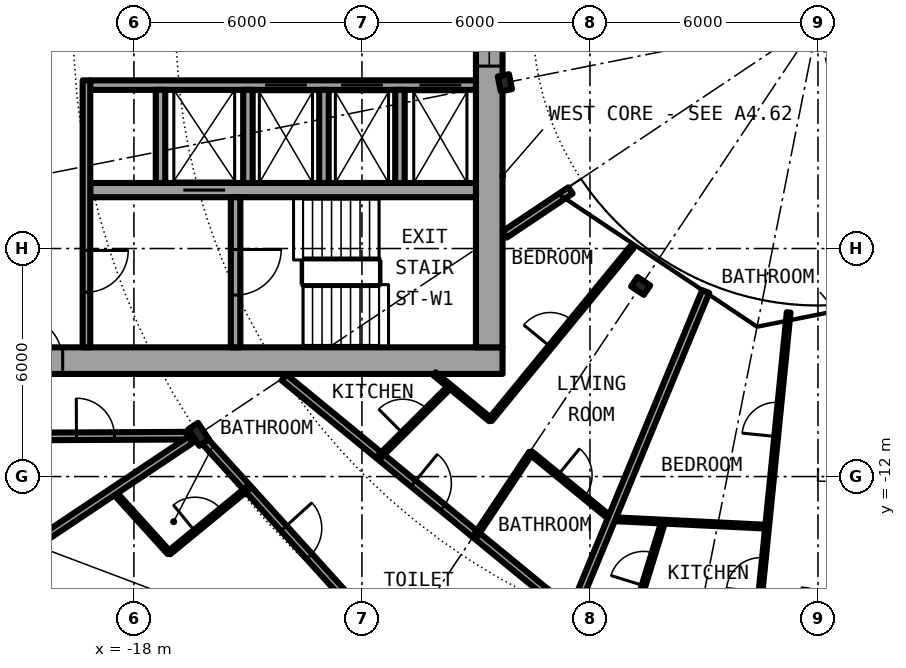
"""IFC4 building model, lengths in metres.
Left out: names, types, materials, properties, quantities, classifications, styles, units other than length and angle.
Written with IfcOpenShell. Run it as: python <this file> out.ifc"""

import sys

from ifc_helpers import new_model, si_unit, direction, frame, frame_2d, origin, origin_2d, place, context, subcontext, project, spatial, rectangle, i_section, extrude, element, fill, save


model = new_model("IFC4")
c1 = context("Model", 3, precision=1e-05, world=origin(), true_north=direction((0.0, 1.0)))
c2 = subcontext(c1, "Body", "Model", "MODEL_VIEW")
j1 = project(units=[si_unit("LENGTHUNIT", "METRE"), si_unit("PLANEANGLEUNIT", "RADIAN")], contexts=[c1])
p1 = place(None, origin())
s1 = spatial("IfcSite", under=j1, at=p1, CompositionType="ELEMENT")
p2 = place(p1, origin())
s2 = spatial("IfcBuilding", under=s1, at=p2, CompositionType="ELEMENT")
p3 = place(p2, frame((0.0, 0.0, 75.8)))
s3 = spatial("IfcBuildingStorey", under=s2, at=p3, CompositionType="ELEMENT", Elevation=75.8)
p4 = place(p3, frame((-16.297, -10.889, 0.0), z_axis=(0.0, 0.0, 1.0), x_axis=(-0.831469612303, -0.55557023302, 0.0)))
e1 = element("IfcColumn", 1, at=p4, inside=s3, PredefinedType="COLUMN", context=c2, shape_type="SweptSolid", body=[
    extrude(i_section(OverallWidth=0.306, OverallDepth=0.524, WebThickness=0.021, FlangeThickness=0.04, FilletRadius=0.027, at=origin_2d()), origin(), (0.0, 0.0, 1.0), 3.05),
])
for number, where, z_axis, x_axis in (
    (2, (-8.239, -1.639, 0.0), (0.0, 0.0, 1.0), (-0.981, -0.195, 0.0)),
    (3, (-4.667, -6.984, 0.0), (0.0, 0.0, 1.0), (-0.556, -0.831, 0.0)),
):
    element("IfcColumn", number, at=place(p3, frame(where, z_axis=z_axis, x_axis=x_axis)), inside=s3, PredefinedType="COLUMN", context=c2, shape_type="SweptSolid", body=[
        extrude(i_section(OverallWidth=0.3, OverallDepth=0.4, WebThickness=0.013, FlangeThickness=0.024, FilletRadius=0.027, at=origin_2d()), origin(), (0.0, 0.0, 1.0), 3.05),
    ])
p5 = place(p3, frame((-22.3, -8.95, 0.0), z_axis=(0.0, 0.0, 1.0), x_axis=(1.0, 0.0, 0.0)))
e4 = element("IfcWall", 4, at=p5, inside=s3, PredefinedType="SHEAR", context=c2, shape_type="SweptSolid", body=[
    extrude(rectangle(XDim=14.0, YDim=0.7, at=frame_2d((7.0, 0.0))), origin(), (0.0, 0.0, 1.0), 3.05),
])
p6 = place(p5, frame((1.225, 0.0, 0.0)))
e5 = element("IfcOpeningElement", 5, at=p6, cuts=e4, PredefinedType="OPENING", context=c2, shape_type="SweptSolid", body=[
    extrude(rectangle(XDim=1.2, YDim=2.3, at=frame_2d((0.6, 1.15))), frame((0.0, 0.36, 0.0), z_axis=(0.0, -1.0, 0.0), x_axis=(1.0, 0.0, 0.0)), (0.0, 0.0, 1.0), 0.72),
])
p7 = place(p3, frame((-8.65, 8.6, 0.0), z_axis=(0.0, 0.0, 1.0), x_axis=(0.0, -1.0, 0.0)))
e6 = element("IfcWall", 6, at=p7, inside=s3, PredefinedType="SHEAR", context=c2, shape_type="SweptSolid", body=[
    extrude(rectangle(XDim=17.2, YDim=0.7, at=frame_2d((8.6, 0.0))), origin(), (0.0, 0.0, 1.0), 3.05),
])
p8 = place(p7, frame((7.4, 0.0, 0.1)))
e7 = element("IfcOpeningElement", 7, at=p8, cuts=e6, PredefinedType="OPENING", context=c2, shape_type="SweptSolid", body=[
    extrude(rectangle(XDim=2.4, YDim=2.2, at=frame_2d((1.2, 1.1))), frame((0.0, 0.36, 0.0), z_axis=(0.0, -1.0, 0.0), x_axis=(1.0, 0.0, 0.0)), (0.0, 0.0, 1.0), 0.72),
])
p9 = place(p3, frame((-9.0, -1.7, 0.0), z_axis=(0.0, 0.0, 1.0), x_axis=(-1.0, 0.0, 0.0)))
e8 = element("IfcWall", 8, at=p9, inside=s3, PredefinedType="SHEAR", context=c2, shape_type="SweptSolid", body=[
    extrude(rectangle(XDim=10.15, YDim=0.25, at=frame_2d((5.075, 0.0))), origin(), (0.0, 0.0, 1.0), 3.05),
])
p10 = place(p9, frame((0.387, 0.0, 0.0)))
e9 = element("IfcOpeningElement", 9, at=p10, cuts=e8, PredefinedType="OPENING", context=c2, shape_type="SweptSolid", body=[
    extrude(rectangle(XDim=1.1, YDim=2.3, at=frame_2d((0.55, 1.15))), frame((0.0, 0.135, 0.0), z_axis=(0.0, -1.0, 0.0), x_axis=(1.0, 0.0, 0.0)), (0.0, 0.0, 1.0), 0.27),
])
p11 = place(p9, frame((2.45, 0.0, 0.0)))
e10 = element("IfcOpeningElement", 10, at=p11, cuts=e8, PredefinedType="OPENING", context=c2, shape_type="SweptSolid", body=[
    extrude(rectangle(XDim=1.1, YDim=2.3, at=frame_2d((0.55, 1.15))), frame((0.0, 0.135, 0.0), z_axis=(0.0, -1.0, 0.0), x_axis=(1.0, 0.0, 0.0)), (0.0, 0.0, 1.0), 0.27),
])
p12 = place(p9, frame((4.45, 0.0, 0.0)))
e11 = element("IfcOpeningElement", 11, at=p12, cuts=e8, PredefinedType="OPENING", context=c2, shape_type="SweptSolid", body=[
    extrude(rectangle(XDim=1.1, YDim=2.3, at=frame_2d((0.55, 1.15))), frame((0.0, 0.135, 0.0), z_axis=(0.0, -1.0, 0.0), x_axis=(1.0, 0.0, 0.0)), (0.0, 0.0, 1.0), 0.27),
])
p13 = place(p3, frame((-9.0, -4.462, 0.0), z_axis=(0.0, 0.0, 1.0), x_axis=(-1.0, 0.0, 0.0)))
e12 = element("IfcWall", 12, at=p13, inside=s3, PredefinedType="SHEAR", context=c2, shape_type="SweptSolid", body=[
    extrude(rectangle(XDim=10.15, YDim=0.375, at=frame_2d((5.075, 0.0))), origin(), (0.0, 0.0, 1.0), 3.05),
])
p14 = place(p13, frame((6.6, 0.0, 0.0)))
e13 = element("IfcOpeningElement", 13, at=p14, cuts=e12, PredefinedType="OPENING", context=c2, shape_type="SweptSolid", body=[
    extrude(rectangle(XDim=1.1, YDim=2.3, at=frame_2d((0.55, 1.15))), frame((0.0, 0.198, 0.0), z_axis=(0.0, -1.0, 0.0), x_axis=(1.0, 0.0, 0.0)), (0.0, 0.0, 1.0), 0.395),
])
p15 = place(p3, frame((-15.325, -4.65, 0.0), z_axis=(0.0, 0.0, 1.0), x_axis=(0.0, -1.0, 0.0)))
e14 = element("IfcWall", 14, at=p15, inside=s3, PredefinedType="SHEAR", context=c2, shape_type="SweptSolid", body=[
    extrude(rectangle(XDim=3.95, YDim=0.25, at=frame_2d((1.975, 0.0))), origin(), (0.0, 0.0, 1.0), 3.05),
])
p16 = place(p15, frame((1.375, 0.0, 0.0)))
e15 = element("IfcOpeningElement", 15, at=p16, cuts=e14, PredefinedType="OPENING", context=c2, shape_type="SweptSolid", body=[
    extrude(rectangle(XDim=1.2, YDim=2.3, at=frame_2d((0.6, 1.15))), frame((0.0, 0.135, 0.0), z_axis=(0.0, -1.0, 0.0), x_axis=(1.0, 0.0, 0.0)), (0.0, 0.0, 1.0), 0.27),
])
for number, where, z_axis, x_axis in (
    (16, (-15.0, -1.825, 0.0), (0.0, 0.0, 1.0), (0.0, -1.0, 0.0)),
    (17, (-17.3, -1.825, 0.0), (0.0, 0.0, 1.0), (0.0, -1.0, 0.0)),
):
    element("IfcWall", number, at=place(p3, frame(where, z_axis=z_axis, x_axis=x_axis)), inside=s3, PredefinedType="SOLIDWALL", context=c2, shape_type="SweptSolid", body=[
        extrude(rectangle(XDim=2.45, YDim=0.25, at=frame_2d((1.225, 0.0))), origin(), (0.0, 0.0, 1.0), 2.7),
    ])
p17 = place(p3, frame((-19.25, -1.575, 0.0), z_axis=(0.0, 0.0, 1.0), x_axis=(0.0, -1.0, 0.0)))
e18 = element("IfcWall", 18, at=p17, inside=s3, PredefinedType="SOLIDWALL", context=c2, shape_type="SweptSolid", body=[
    extrude(rectangle(XDim=7.025, YDim=0.2, at=frame_2d((3.513, 0.0))), origin(), (0.0, 0.0, 1.0), 2.7),
])
p18 = place(p17, frame((4.475, 0.0, 0.0)))
e19 = element("IfcOpeningElement", 19, at=p18, cuts=e18, PredefinedType="OPENING", context=c2, shape_type="SweptSolid", body=[
    extrude(rectangle(XDim=1.1, YDim=2.3, at=frame_2d((0.55, 1.15))), frame((0.0, 0.11, 0.0), z_axis=(0.0, -1.0, 0.0), x_axis=(1.0, 0.0, 0.0)), (0.0, 0.0, 1.0), 0.22),
])
for number, where, z_axis, x_axis in (
    (20, (-11.0, -1.825, 0.0), (0.0, 0.0, 1.0), (0.0, -1.0, 0.0)),
    (21, (-13.0, -1.825, 0.0), (0.0, 0.0, 1.0), (0.0, -1.0, 0.0)),
):
    element("IfcWall", number, at=place(p3, frame(where, z_axis=z_axis, x_axis=x_axis)), inside=s3, PredefinedType="SOLIDWALL", context=c2, shape_type="SweptSolid", body=[
        extrude(rectangle(XDim=2.45, YDim=0.25, at=frame_2d((1.225, 0.0))), origin(), (0.0, 0.0, 1.0), 2.7),
    ])
p19 = place(p3, frame((-18.542, -12.389, 0.0), z_axis=(0.0, 0.0, 1.0), x_axis=(0.671396556615, -0.741098282123, 0.0)))
e22 = element("IfcWall", 22, at=p19, inside=s3, PredefinedType="PARTITIONING", context=c2, shape_type="SweptSolid", body=[
    extrude(rectangle(XDim=2.182, YDim=0.1, at=frame_2d((1.091, 0.0))), origin(), (0.0, 0.0, 1.0), 2.7),
])
p20 = place(p3, frame((-16.193, -11.004, 0.0), z_axis=(0.0, 0.0, 1.0), x_axis=(0.671601747072, -0.740912338492, 0.0)))
e23 = element("IfcWall", 23, at=p20, inside=s3, PredefinedType="PARTITIONING", context=c2, shape_type="SweptSolid", body=[
    extrude(rectangle(XDim=5.597, YDim=0.2, at=frame_2d((2.799, 0.0))), origin(), (0.0, 0.0, 1.0), 2.38),
])
p21 = place(p20, frame((3.18, 0.0, 0.0)))
e24 = element("IfcOpeningElement", 24, at=p21, cuts=e23, PredefinedType="OPENING", context=c2, shape_type="SweptSolid", body=[
    extrude(rectangle(XDim=1.0, YDim=2.3, at=frame_2d((0.5, 1.15))), frame((0.0, 0.11, 0.0), z_axis=(0.0, -1.0, 0.0), x_axis=(1.0, 0.0, 0.0)), (0.0, 0.0, 1.0), 0.22),
])
p22 = place(p3, frame((-14.05, -9.392, 0.0), z_axis=(0.0, 0.0, 1.0), x_axis=(0.773074935257, -0.634314704605, 0.0)))
e25 = element("IfcWall", 25, at=p22, inside=s3, PredefinedType="PARTITIONING", context=c2, shape_type="SweptSolid", body=[
    extrude(rectangle(XDim=9.809, YDim=0.2, at=frame_2d((4.904, 0.0))), origin(), (0.0, 0.0, 1.0), 2.7),
])
p23 = place(p22, frame((4.402, 0.0, 0.0)))
e26 = element("IfcOpeningElement", 26, at=p23, cuts=e25, PredefinedType="OPENING", context=c2, shape_type="SweptSolid", body=[
    extrude(rectangle(XDim=1.0, YDim=2.3, at=frame_2d((0.5, 1.15))), frame((0.0, 0.11, 0.0), z_axis=(0.0, -1.0, 0.0), x_axis=(1.0, 0.0, 0.0)), (0.0, 0.0, 1.0), 0.22),
])
p24 = place(p3, frame((-10.093, -9.296, 0.0), z_axis=(0.0, 0.0, 1.0), x_axis=(0.772957368531, -0.6344579627, 0.0)))
e27 = element("IfcWall", 27, at=p24, inside=s3, PredefinedType="PARTITIONING", context=c2, shape_type="SweptSolid", body=[
    extrude(rectangle(XDim=1.906, YDim=0.1, at=frame_2d((0.953, 0.0))), origin(), (0.0, 0.0, 1.0), 2.7),
])
p25 = place(p3, frame((-7.558, -11.376, 0.0), z_axis=(0.0, 0.0, 1.0), x_axis=(0.773049907698, -0.634345205868, 0.0)))
e28 = element("IfcWall", 28, at=p25, inside=s3, PredefinedType="PARTITIONING", context=c2, shape_type="SweptSolid", body=[
    extrude(rectangle(XDim=2.748, YDim=0.1, at=frame_2d((1.374, 0.0))), origin(), (0.0, 0.0, 1.0), 2.7),
])
p26 = place(p25, frame((0.924, 0.0, 0.0)))
e29 = element("IfcOpeningElement", 29, at=p26, cuts=e28, PredefinedType="OPENING", context=c2, shape_type="SweptSolid", body=[
    extrude(rectangle(XDim=0.9, YDim=2.3, at=frame_2d((0.45, 1.15))), frame((0.0, 0.06, 0.0), z_axis=(0.0, -1.0, 0.0), x_axis=(1.0, 0.0, 0.0)), (0.0, 0.0, 1.0), 0.12),
])
p27 = place(p3, frame((-5.434, -13.119, 0.0), z_axis=(0.0, 0.0, 1.0), x_axis=(0.998795469779, -0.049067398026, 0.0)))
e30 = element("IfcWall", 30, at=p27, inside=s3, PredefinedType="PARTITIONING", context=c2, shape_type="SweptSolid", body=[
    extrude(rectangle(XDim=4.1, YDim=0.1, at=frame_2d((2.05, 0.0))), origin(), (0.0, 0.0, 1.0), 2.7),
])
p28 = place(p3, frame((-21.675, -10.95, 0.0), z_axis=(0.0, 0.0, 1.0), x_axis=(0.999987054722, 0.005088259783, 0.0)))
e31 = element("IfcWall", 31, at=p28, inside=s3, PredefinedType="PARTITIONING", context=c2, shape_type="SweptSolid", body=[
    extrude(rectangle(XDim=5.086, YDim=0.2, at=frame_2d((2.543, 0.0))), origin(), (0.0, 0.0, 1.0), 2.7),
])
p29 = place(p28, frame((2.163, 0.0, 0.0)))
e32 = element("IfcOpeningElement", 32, at=p29, cuts=e31, PredefinedType="OPENING", context=c2, shape_type="SweptSolid", body=[
    extrude(rectangle(XDim=1.0, YDim=2.3, at=frame_2d((0.5, 1.15))), frame((0.0, 0.11, 0.0), z_axis=(0.0, -1.0, 0.0), x_axis=(1.0, 0.0, 0.0)), (0.0, 0.0, 1.0), 0.22),
])
p30 = place(p3, frame((-6.513, -4.472, 0.0), z_axis=(0.0, 0.0, 1.0), x_axis=(-0.831382204863, -0.555701025225, 0.0)))
e33 = element("IfcWall", 33, at=p30, inside=s3, PredefinedType="PARTITIONING", context=c2, shape_type="SweptSolid", body=[
    extrude(rectangle(XDim=2.082, YDim=0.2, at=frame_2d((1.041, 0.0))), origin(), (0.0, 0.0, 1.0), 2.7),
])
p31 = place(p3, frame((-22.595, -15.097, 0.0), z_axis=(0.0, 0.0, 1.0), x_axis=(0.831505405283, 0.555516661303, 0.0)))
e34 = element("IfcWall", 34, at=p31, inside=s3, PredefinedType="PARTITIONING", context=c2, shape_type="SweptSolid", body=[
    extrude(rectangle(XDim=7.312, YDim=0.2, at=frame_2d((3.656, 0.0))), origin(), (0.0, 0.0, 1.0), 2.7),
])
p32 = place(p3, frame((-17.077, -14.006, 0.0), z_axis=(0.0, 0.0, 1.0), x_axis=(0.77319617123, 0.634166918717, 0.0)))
e35 = element("IfcWall", 35, at=p32, inside=s3, PredefinedType="PARTITIONING", context=c2, shape_type="SweptSolid", body=[
    extrude(rectangle(XDim=2.675, YDim=0.1, at=frame_2d((1.337, 0.0))), origin(), (0.0, 0.0, 1.0), 2.7),
])
p33 = place(p32, frame((0.887, 0.0, 0.0)))
e36 = element("IfcOpeningElement", 36, at=p33, cuts=e35, PredefinedType="OPENING", context=c2, shape_type="SweptSolid", body=[
    extrude(rectangle(XDim=0.9, YDim=2.3, at=frame_2d((0.45, 1.15))), frame((0.0, 0.06, 0.0), z_axis=(0.0, -1.0, 0.0), x_axis=(1.0, 0.0, 0.0)), (0.0, 0.0, 1.0), 0.12),
])
p34 = place(p3, frame((-11.524, -11.464, 0.0), z_axis=(0.0, 0.0, 1.0), x_axis=(0.708796844581, 0.705412668665, 0.0)))
e37 = element("IfcWall", 37, at=p34, inside=s3, PredefinedType="PARTITIONING", context=c2, shape_type="SweptSolid", body=[
    extrude(rectangle(XDim=2.597, YDim=0.1, at=frame_2d((1.299, 0.0))), origin(), (0.0, 0.0, 1.0), 2.7),
])
p35 = place(p34, frame((0.849, 0.0, 0.0)))
e38 = element("IfcOpeningElement", 38, at=p35, cuts=e37, PredefinedType="OPENING", context=c2, shape_type="SweptSolid", body=[
    extrude(rectangle(XDim=0.9, YDim=2.3, at=frame_2d((0.45, 1.15))), frame((0.0, 0.06, 0.0), z_axis=(0.0, -1.0, 0.0), x_axis=(1.0, 0.0, 0.0)), (0.0, 0.0, 1.0), 0.12),
])
p36 = place(p3, frame((-8.996, -13.539, 0.0), z_axis=(0.0, 0.0, 1.0), x_axis=(0.553615197403, 0.83277260594, 0.0)))
e39 = element("IfcWall", 39, at=p36, inside=s3, PredefinedType="PARTITIONING", context=c2, shape_type="SweptSolid", body=[
    extrude(rectangle(XDim=2.597, YDim=0.1, at=frame_2d((1.299, 0.0))), origin(), (0.0, 0.0, 1.0), 2.7),
])
p37 = place(p3, frame((-8.62, -10.504, 0.0), z_axis=(0.0, 0.0, 1.0), x_axis=(0.634358693064, 0.773038840249, 0.0)))
e40 = element("IfcWall", 40, at=p37, inside=s3, PredefinedType="PARTITIONING", context=c2, shape_type="SweptSolid", body=[
    extrude(rectangle(XDim=5.868, YDim=0.1, at=frame_2d((2.934, 0.0))), origin(), (0.0, 0.0, 1.0), 2.7),
])
p38 = place(p37, frame((2.484, 0.0, 0.0)))
e41 = element("IfcOpeningElement", 41, at=p38, cuts=e40, PredefinedType="OPENING", context=c2, shape_type="SweptSolid", body=[
    extrude(rectangle(XDim=0.9, YDim=2.3, at=frame_2d((0.45, 1.15))), frame((0.0, 0.06, 0.0), z_axis=(0.0, -1.0, 0.0), x_axis=(1.0, 0.0, 0.0)), (0.0, 0.0, 1.0), 0.12),
])
p39 = place(p3, frame((-6.467, -15.614, 0.0), z_axis=(0.0, 0.0, 1.0), x_axis=(0.382646942224, 0.923894646378, 0.0)))
e42 = element("IfcWall", 42, at=p39, inside=s3, PredefinedType="PARTITIONING", context=c2, shape_type="SweptSolid", body=[
    extrude(rectangle(XDim=9.181, YDim=0.2, at=frame_2d((4.59, 0.0))), origin(), (0.0, 0.0, 1.0), 2.7),
])
p40 = place(p3, frame((-4.843, -15.693, 0.0), z_axis=(0.0, 0.0, 1.0), x_axis=(0.294961884541, 0.955509019669, 0.0)))
e43 = element("IfcWall", 43, at=p40, inside=s3, PredefinedType="PARTITIONING", context=c2, shape_type="SweptSolid", body=[
    extrude(rectangle(XDim=2.624, YDim=0.1, at=frame_2d((1.312, 0.0))), origin(), (0.0, 0.0, 1.0), 2.7),
])
p41 = place(p40, frame((0.862, 0.0, 0.0)))
e44 = element("IfcOpeningElement", 44, at=p41, cuts=e43, PredefinedType="OPENING", context=c2, shape_type="SweptSolid", body=[
    extrude(rectangle(XDim=0.9, YDim=2.3, at=frame_2d((0.45, 1.15))), frame((0.0, 0.06, 0.0), z_axis=(0.0, -1.0, 0.0), x_axis=(1.0, 0.0, 0.0)), (0.0, 0.0, 1.0), 0.12),
])
p42 = place(p3, frame((-1.593, -15.853, 0.0), z_axis=(0.0, 0.0, 1.0), x_axis=(0.100083483356, 0.994979043176, 0.0)))
e45 = element("IfcWall", 45, at=p42, inside=s3, PredefinedType="PARTITIONING", context=c2, shape_type="SweptSolid", body=[
    extrude(rectangle(XDim=8.213, YDim=0.1, at=frame_2d((4.107, 0.0))), origin(), (0.0, 0.0, 1.0), 2.7),
])
p43 = place(p42, frame((0.823, 0.0, 0.0)))
e46 = element("IfcOpeningElement", 46, at=p43, cuts=e45, PredefinedType="OPENING", context=c2, shape_type="SweptSolid", body=[
    extrude(rectangle(XDim=0.9, YDim=2.3, at=frame_2d((0.45, 1.15))), frame((0.0, 0.06, 0.0), z_axis=(0.0, -1.0, 0.0), x_axis=(1.0, 0.0, 0.0)), (0.0, 0.0, 1.0), 0.12),
])
p44 = place(p42, frame((4.931, 0.0, 0.0)))
e47 = element("IfcOpeningElement", 47, at=p44, cuts=e45, PredefinedType="OPENING", context=c2, shape_type="SweptSolid", body=[
    extrude(rectangle(XDim=0.9, YDim=2.3, at=frame_2d((0.45, 1.15))), frame((0.0, 0.06, 0.0), z_axis=(0.0, -1.0, 0.0), x_axis=(1.0, 0.0, 0.0)), (0.0, 0.0, 1.0), 0.12),
])
p45 = place(p10, origin())
e48 = element("IfcDoor", 48, at=p45, inside=s3, OperationType="DOUBLE_DOOR_SLIDING", PredefinedType="DOOR", context=c2, shape_type="SweptSolid", body=[
    extrude(rectangle(XDim=1.1, YDim=2.3, at=frame_2d((0.55, 1.15))), frame((0.0, 0.025, 0.0), z_axis=(0.0, -1.0, 0.0), x_axis=(1.0, 0.0, 0.0)), (0.0, 0.0, 1.0), 0.05),
])
fill(e9, e48)
p46 = place(p11, origin())
e49 = element("IfcDoor", 49, at=p46, inside=s3, OperationType="DOUBLE_DOOR_SLIDING", PredefinedType="DOOR", context=c2, shape_type="SweptSolid", body=[
    extrude(rectangle(XDim=1.1, YDim=2.3, at=frame_2d((0.55, 1.15))), frame((0.0, 0.025, 0.0), z_axis=(0.0, -1.0, 0.0), x_axis=(1.0, 0.0, 0.0)), (0.0, 0.0, 1.0), 0.05),
])
fill(e10, e49)
p47 = place(p12, origin())
e50 = element("IfcDoor", 50, at=p47, inside=s3, OperationType="DOUBLE_DOOR_SLIDING", PredefinedType="DOOR", context=c2, shape_type="SweptSolid", body=[
    extrude(rectangle(XDim=1.1, YDim=2.3, at=frame_2d((0.55, 1.15))), frame((0.0, 0.025, 0.0), z_axis=(0.0, -1.0, 0.0), x_axis=(1.0, 0.0, 0.0)), (0.0, 0.0, 1.0), 0.05),
])
fill(e11, e50)
p48 = place(p14, origin())
e51 = element("IfcDoor", 51, at=p48, inside=s3, OperationType="DOUBLE_DOOR_SLIDING", PredefinedType="DOOR", context=c2, shape_type="SweptSolid", body=[
    extrude(rectangle(XDim=1.1, YDim=2.3, at=frame_2d((0.55, 1.15))), frame((0.0, 0.025, 0.0), z_axis=(0.0, -1.0, 0.0), x_axis=(1.0, 0.0, 0.0)), (0.0, 0.0, 1.0), 0.05),
])
fill(e13, e51)
p49 = place(p16, origin())
e52 = element("IfcDoor", 52, at=p49, inside=s3, OperationType="SINGLE_SWING_LEFT", PredefinedType="DOOR", context=c2, shape_type="SweptSolid", body=[
    extrude(rectangle(XDim=1.2, YDim=2.3, at=frame_2d((0.6, 1.15))), frame((0.0, 0.025, 0.0), z_axis=(0.0, -1.0, 0.0), x_axis=(1.0, 0.0, 0.0)), (0.0, 0.0, 1.0), 0.05),
])
fill(e15, e52)
p50 = place(p18, origin())
e53 = element("IfcDoor", 53, at=p50, inside=s3, OperationType="SINGLE_SWING_LEFT", PredefinedType="DOOR", context=c2, shape_type="SweptSolid", body=[
    extrude(rectangle(XDim=1.1, YDim=2.3, at=frame_2d((0.55, 1.15))), frame((0.0, 0.025, 0.0), z_axis=(0.0, -1.0, 0.0), x_axis=(1.0, 0.0, 0.0)), (0.0, 0.0, 1.0), 0.05),
])
fill(e19, e53)
p51 = place(p6, origin())
e54 = element("IfcDoor", 54, at=p51, inside=s3, OperationType="SINGLE_SWING_RIGHT", PredefinedType="DOOR", context=c2, shape_type="SweptSolid", body=[
    extrude(rectangle(XDim=1.2, YDim=2.3, at=frame_2d((0.6, 1.15))), frame((0.0, 0.025, 0.0), z_axis=(0.0, -1.0, 0.0), x_axis=(1.0, 0.0, 0.0)), (0.0, 0.0, 1.0), 0.05),
])
fill(e5, e54)
p52 = place(p8, origin())
e55 = element("IfcWindow", 55, at=p52, inside=s3, PartitioningType="SINGLE_PANEL", PredefinedType="WINDOW", context=c2, shape_type="SweptSolid", body=[
    extrude(rectangle(XDim=2.4, YDim=2.2, at=frame_2d((1.2, 1.1))), frame((0.0, 0.03, 0.0), z_axis=(0.0, -1.0, 0.0), x_axis=(1.0, 0.0, 0.0)), (0.0, 0.0, 1.0), 0.06),
])
fill(e7, e55)
p53 = place(p21, origin())
e56 = element("IfcDoor", 56, at=p53, inside=s3, OperationType="SINGLE_SWING_RIGHT", PredefinedType="DOOR", context=c2, shape_type="SweptSolid", body=[
    extrude(rectangle(XDim=1.0, YDim=2.3, at=frame_2d((0.5, 1.15))), frame((0.0, 0.025, 0.0), z_axis=(0.0, -1.0, 0.0), x_axis=(1.0, 0.0, 0.0)), (0.0, 0.0, 1.0), 0.05),
])
fill(e24, e56)
p54 = place(p33, origin())
e57 = element("IfcDoor", 57, at=p54, inside=s3, OperationType="SINGLE_SWING_LEFT", PredefinedType="DOOR", context=c2, shape_type="SweptSolid", body=[
    extrude(rectangle(XDim=0.9, YDim=2.3, at=frame_2d((0.45, 1.15))), frame((0.0, 0.025, 0.0), z_axis=(0.0, -1.0, 0.0), x_axis=(1.0, 0.0, 0.0)), (0.0, 0.0, 1.0), 0.05),
])
fill(e36, e57)
p55 = place(p23, origin())
e58 = element("IfcDoor", 58, at=p55, inside=s3, OperationType="SINGLE_SWING_LEFT", PredefinedType="DOOR", context=c2, shape_type="SweptSolid", body=[
    extrude(rectangle(XDim=1.0, YDim=2.3, at=frame_2d((0.5, 1.15))), frame((0.0, 0.025, 0.0), z_axis=(0.0, -1.0, 0.0), x_axis=(1.0, 0.0, 0.0)), (0.0, 0.0, 1.0), 0.05),
])
fill(e26, e58)
p56 = place(p26, origin())
e59 = element("IfcDoor", 59, at=p56, inside=s3, OperationType="SINGLE_SWING_LEFT", PredefinedType="DOOR", context=c2, shape_type="SweptSolid", body=[
    extrude(rectangle(XDim=0.9, YDim=2.3, at=frame_2d((0.45, 1.15))), frame((0.0, 0.025, 0.0), z_axis=(0.0, -1.0, 0.0), x_axis=(1.0, 0.0, 0.0)), (0.0, 0.0, 1.0), 0.05),
])
fill(e29, e59)
p57 = place(p35, origin())
e60 = element("IfcDoor", 60, at=p57, inside=s3, OperationType="SINGLE_SWING_RIGHT", PredefinedType="DOOR", context=c2, shape_type="SweptSolid", body=[
    extrude(rectangle(XDim=0.9, YDim=2.3, at=frame_2d((0.45, 1.15))), frame((0.0, 0.025, 0.0), z_axis=(0.0, -1.0, 0.0), x_axis=(1.0, 0.0, 0.0)), (0.0, 0.0, 1.0), 0.05),
])
fill(e38, e60)
p58 = place(p38, origin())
e61 = element("IfcDoor", 61, at=p58, inside=s3, OperationType="SINGLE_SWING_RIGHT", PredefinedType="DOOR", context=c2, shape_type="SweptSolid", body=[
    extrude(rectangle(XDim=0.9, YDim=2.3, at=frame_2d((0.45, 1.15))), frame((0.0, 0.025, 0.0), z_axis=(0.0, -1.0, 0.0), x_axis=(1.0, 0.0, 0.0)), (0.0, 0.0, 1.0), 0.05),
])
fill(e41, e61)
p59 = place(p43, origin())
e62 = element("IfcDoor", 62, at=p59, inside=s3, OperationType="SINGLE_SWING_LEFT", PredefinedType="DOOR", context=c2, shape_type="SweptSolid", body=[
    extrude(rectangle(XDim=0.9, YDim=2.3, at=frame_2d((0.45, 1.15))), frame((0.0, 0.025, 0.0), z_axis=(0.0, -1.0, 0.0), x_axis=(1.0, 0.0, 0.0)), (0.0, 0.0, 1.0), 0.05),
])
fill(e46, e62)
p60 = place(p41, origin())
e63 = element("IfcDoor", 63, at=p60, inside=s3, OperationType="SINGLE_SWING_RIGHT", PredefinedType="DOOR", context=c2, shape_type="SweptSolid", body=[
    extrude(rectangle(XDim=0.9, YDim=2.3, at=frame_2d((0.45, 1.15))), frame((0.0, 0.025, 0.0), z_axis=(0.0, -1.0, 0.0), x_axis=(1.0, 0.0, 0.0)), (0.0, 0.0, 1.0), 0.05),
])
fill(e44, e63)
p61 = place(p44, origin())
e64 = element("IfcDoor", 64, at=p61, inside=s3, OperationType="SINGLE_SWING_RIGHT", PredefinedType="DOOR", context=c2, shape_type="SweptSolid", body=[
    extrude(rectangle(XDim=0.9, YDim=2.3, at=frame_2d((0.45, 1.15))), frame((0.0, 0.025, 0.0), z_axis=(0.0, -1.0, 0.0), x_axis=(1.0, 0.0, 0.0)), (0.0, 0.0, 1.0), 0.05),
])
fill(e47, e64)
p62 = place(p29, origin())
e65 = element("IfcDoor", 65, at=p62, inside=s3, OperationType="SINGLE_SWING_RIGHT", PredefinedType="DOOR", context=c2, shape_type="SweptSolid", body=[
    extrude(rectangle(XDim=1.0, YDim=2.3, at=frame_2d((0.5, 1.15))), frame((0.0, 0.025, 0.0), z_axis=(0.0, -1.0, 0.0), x_axis=(1.0, 0.0, 0.0)), (0.0, 0.0, 1.0), 0.05),
])
fill(e32, e65)
save(model, sys.argv[1])
